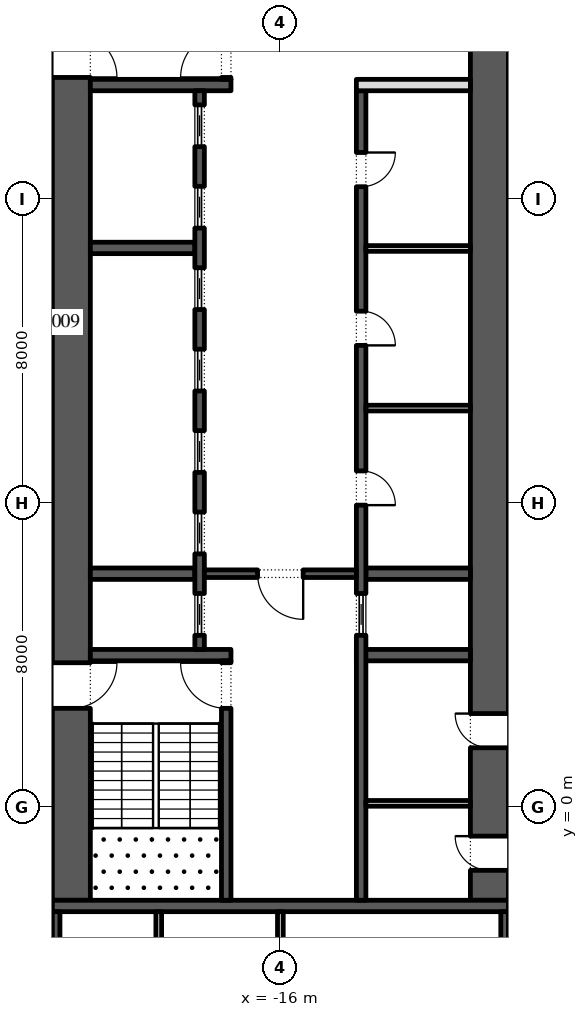
"""IFC4 building model, lengths in metres.
Left out: names, types, materials, properties, quantities, classifications, styles, units other than length and angle.
Written with IfcOpenShell. Run it as: python <this file> out.ifc"""

import sys

from ifc_helpers import new_model, si_unit, direction, frame, frame_2d, origin, place, context, subcontext, project, spatial, rectangle, extrude, element, fill, save


model = new_model("IFC4")
c1 = context("Model", 3, precision=1e-05, world=origin(), true_north=direction((0.0, 1.0)))
c2 = subcontext(c1, "Body", "Model", "MODEL_VIEW")
j1 = project(units=[si_unit("LENGTHUNIT", "METRE"), si_unit("PLANEANGLEUNIT", "RADIAN")], contexts=[c1])
p1 = place(None, origin())
s1 = spatial("IfcSite", under=j1, at=p1, CompositionType="ELEMENT")
p2 = place(p1, origin())
s2 = spatial("IfcBuilding", under=s1, at=p2, CompositionType="ELEMENT")
p3 = place(p2, frame((0.0, 0.0, 64.8)))
s3 = spatial("IfcBuildingStorey", under=s2, at=p3, CompositionType="ELEMENT", Elevation=64.8)
p4 = place(p3, frame((-21.5, -2.45, 0.0), z_axis=(0.0, 0.0, 1.0), x_axis=(0.0, 1.0, 0.0)))
e1 = element("IfcWall", 1, at=p4, inside=s3, PredefinedType="SHEAR", context=c2, shape_type="SweptSolid", body=[
    extrude(rectangle(XDim=27.9, YDim=1.0, at=frame_2d((13.95, 0.0))), origin(), (0.0, 0.0, 1.0), 4.0),
])
p5 = place(p4, frame((5.05, 0.0, 0.0)))
e2 = element("IfcOpeningElement", 2, at=p5, cuts=e1, PredefinedType="OPENING", context=c2, shape_type="SweptSolid", body=[
    extrude(rectangle(XDim=1.2, YDim=2.1, at=frame_2d((0.6, 1.05))), frame((0.0, 0.51, 0.0), z_axis=(0.0, -1.0, 0.0), x_axis=(1.0, 0.0, 0.0)), (0.0, 0.0, 1.0), 1.02),
])
p6 = place(p4, frame((21.65, 0.0, 0.0)))
e3 = element("IfcOpeningElement", 3, at=p6, cuts=e1, PredefinedType="OPENING", context=c2, shape_type="SweptSolid", body=[
    extrude(rectangle(XDim=1.2, YDim=2.1, at=frame_2d((0.6, 1.05))), frame((0.0, 0.51, 0.0), z_axis=(0.0, -1.0, 0.0), x_axis=(1.0, 0.0, 0.0)), (0.0, 0.0, 1.0), 1.02),
])
p7 = place(p3, frame((-10.5, -2.45, 0.0), z_axis=(0.0, 0.0, 1.0), x_axis=(0.0, 1.0, 0.0)))
e4 = element("IfcWall", 4, at=p7, inside=s3, PredefinedType="SHEAR", context=c2, shape_type="SweptSolid", body=[
    extrude(rectangle(XDim=27.9, YDim=1.0, at=frame_2d((13.95, 0.0))), origin(), (0.0, 0.0, 1.0), 4.0),
])
p8 = place(p7, frame((23.65, 0.0, 0.0)))
e5 = element("IfcOpeningElement", 5, at=p8, cuts=e4, PredefinedType="OPENING", context=c2, shape_type="SweptSolid", body=[
    extrude(rectangle(XDim=2.4, YDim=2.1, at=frame_2d((1.2, 1.05))), frame((0.0, 0.51, 0.0), z_axis=(0.0, -1.0, 0.0), x_axis=(1.0, 0.0, 0.0)), (0.0, 0.0, 1.0), 1.02),
])
p9 = place(p7, frame((0.788, 0.0, 0.0)))
e6 = element("IfcOpeningElement", 6, at=p9, cuts=e4, PredefinedType="OPENING", context=c2, shape_type="SweptSolid", body=[
    extrude(rectangle(XDim=0.9, YDim=2.1, at=frame_2d((0.45, 1.05))), frame((0.0, 0.51, 0.0), z_axis=(0.0, -1.0, 0.0), x_axis=(1.0, 0.0, 0.0)), (0.0, 0.0, 1.0), 1.02),
])
p10 = place(p7, frame((4.012, 0.0, 0.0)))
e7 = element("IfcOpeningElement", 7, at=p10, cuts=e4, PredefinedType="OPENING", context=c2, shape_type="SweptSolid", body=[
    extrude(rectangle(XDim=0.9, YDim=2.1, at=frame_2d((0.45, 1.05))), frame((0.0, 0.51, 0.0), z_axis=(0.0, -1.0, 0.0), x_axis=(1.0, 0.0, 0.0)), (0.0, 0.0, 1.0), 1.02),
])
p11 = place(p3, frame((-22.0, -2.6, 0.0), z_axis=(0.0, 0.0, 1.0), x_axis=(1.0, 0.0, 0.0)))
e8 = element("IfcWall", 8, at=p11, inside=s3, PredefinedType="SHEAR", context=c2, shape_type="SweptSolid", body=[
    extrude(rectangle(XDim=12.0, YDim=0.3, at=frame_2d((6.0, 0.0))), origin(), (0.0, 0.0, 1.0), 4.0),
])
p12 = place(p3, frame((-21.0, 4.0, 0.0), z_axis=(0.0, 0.0, 1.0), x_axis=(1.0, 0.0, 0.0)))
e9 = element("IfcWall", 9, at=p12, inside=s3, PredefinedType="SHEAR", context=c2, shape_type="SweptSolid", body=[
    extrude(rectangle(XDim=3.7, YDim=0.3, at=frame_2d((1.85, 0.0))), origin(), (0.0, 0.0, 1.0), 4.0),
])
p13 = place(p3, frame((-17.425, -2.45, 0.0), z_axis=(0.0, 0.0, 1.0), x_axis=(0.0, 1.0, 0.0)))
e10 = element("IfcWall", 10, at=p13, inside=s3, PredefinedType="SHEAR", context=c2, shape_type="SweptSolid", body=[
    extrude(rectangle(XDim=6.3, YDim=0.25, at=frame_2d((3.15, 0.0))), origin(), (0.0, 0.0, 1.0), 4.0),
])
p14 = place(p13, frame((5.05, 0.0, 0.0)))
e11 = element("IfcOpeningElement", 11, at=p14, cuts=e10, PredefinedType="OPENING", context=c2, shape_type="SweptSolid", body=[
    extrude(rectangle(XDim=1.2, YDim=2.1, at=frame_2d((0.6, 1.05))), frame((0.0, 0.135, 0.0), z_axis=(0.0, -1.0, 0.0), x_axis=(1.0, 0.0, 0.0)), (0.0, 0.0, 1.0), 0.27),
])
p15 = place(p3, frame((-21.0, 19.0, 0.0), z_axis=(0.0, 0.0, 1.0), x_axis=(1.0, 0.0, 0.0)))
e12 = element("IfcWall", 12, at=p15, inside=s3, PredefinedType="SHEAR", context=c2, shape_type="SweptSolid", body=[
    extrude(rectangle(XDim=3.7, YDim=0.3, at=frame_2d((1.85, 0.0))), origin(), (0.0, 0.0, 1.0), 4.0),
])
p16 = place(p3, frame((-17.425, 19.15, 0.0), z_axis=(0.0, 0.0, 1.0), x_axis=(0.0, 1.0, 0.0)))
e13 = element("IfcWall", 13, at=p16, inside=s3, PredefinedType="SHEAR", context=c2, shape_type="SweptSolid", body=[
    extrude(rectangle(XDim=6.3, YDim=0.25, at=frame_2d((3.15, 0.0))), origin(), (0.0, 0.0, 1.0), 4.0),
])
p17 = place(p16, frame((0.05, 0.0, 0.0)))
e14 = element("IfcOpeningElement", 14, at=p17, cuts=e13, PredefinedType="OPENING", context=c2, shape_type="SweptSolid", body=[
    extrude(rectangle(XDim=1.2, YDim=2.1, at=frame_2d((0.6, 1.05))), frame((0.0, 0.135, 0.0), z_axis=(0.0, -1.0, 0.0), x_axis=(1.0, 0.0, 0.0)), (0.0, 0.0, 1.0), 0.27),
])
for number, where, z_axis, x_axis in (
    (15, (-21.0, 6.143, 0.0), (0.0, 0.0, 1.0), (1.0, 0.0, 0.0)),
    (16, (-21.0, 14.714, 0.0), (0.0, 0.0, 1.0), (1.0, 0.0, 0.0)),
):
    element("IfcWall", number, at=place(p3, frame(where, z_axis=z_axis, x_axis=x_axis)), inside=s3, PredefinedType="SHEAR", context=c2, shape_type="SweptSolid", body=[
        extrude(rectangle(XDim=2.75, YDim=0.3, at=frame_2d((1.375, 0.0))), origin(), (0.0, 0.0, 1.0), 4.0),
    ])
p18 = place(p3, frame((-18.125, 4.15, 0.0), z_axis=(0.0, 0.0, 1.0), x_axis=(0.0, 1.0, 0.0)))
e17 = element("IfcWall", 17, at=p18, inside=s3, PredefinedType="SHEAR", context=c2, shape_type="SweptSolid", body=[
    extrude(rectangle(XDim=14.7, YDim=0.25, at=frame_2d((7.35, 0.0))), origin(), (0.0, 0.0, 1.0), 4.0),
])
p19 = place(p18, frame((0.371, 0.0, 0.0)))
e18 = element("IfcOpeningElement", 18, at=p19, cuts=e17, PredefinedType="OPENING", context=c2, shape_type="SweptSolid", body=[
    extrude(rectangle(XDim=1.1, YDim=2.1, at=frame_2d((0.55, 1.05))), frame((0.0, 0.135, 0.0), z_axis=(0.0, -1.0, 0.0), x_axis=(1.0, 0.0, 0.0)), (0.0, 0.0, 1.0), 0.27),
])
p20 = place(p18, frame((2.514, 0.0, 0.0)))
e19 = element("IfcOpeningElement", 19, at=p20, cuts=e17, PredefinedType="OPENING", context=c2, shape_type="SweptSolid", body=[
    extrude(rectangle(XDim=1.1, YDim=2.1, at=frame_2d((0.55, 1.05))), frame((0.0, 0.135, 0.0), z_axis=(0.0, -1.0, 0.0), x_axis=(1.0, 0.0, 0.0)), (0.0, 0.0, 1.0), 0.27),
])
p21 = place(p18, frame((4.657, 0.0, 0.0)))
e20 = element("IfcOpeningElement", 20, at=p21, cuts=e17, PredefinedType="OPENING", context=c2, shape_type="SweptSolid", body=[
    extrude(rectangle(XDim=1.1, YDim=2.1, at=frame_2d((0.55, 1.05))), frame((0.0, 0.135, 0.0), z_axis=(0.0, -1.0, 0.0), x_axis=(1.0, 0.0, 0.0)), (0.0, 0.0, 1.0), 0.27),
])
p22 = place(p18, frame((6.8, 0.0, 0.0)))
e21 = element("IfcOpeningElement", 21, at=p22, cuts=e17, PredefinedType="OPENING", context=c2, shape_type="SweptSolid", body=[
    extrude(rectangle(XDim=1.1, YDim=2.1, at=frame_2d((0.55, 1.05))), frame((0.0, 0.135, 0.0), z_axis=(0.0, -1.0, 0.0), x_axis=(1.0, 0.0, 0.0)), (0.0, 0.0, 1.0), 0.27),
])
p23 = place(p18, frame((8.943, 0.0, 0.0)))
e22 = element("IfcOpeningElement", 22, at=p23, cuts=e17, PredefinedType="OPENING", context=c2, shape_type="SweptSolid", body=[
    extrude(rectangle(XDim=1.1, YDim=2.1, at=frame_2d((0.55, 1.05))), frame((0.0, 0.135, 0.0), z_axis=(0.0, -1.0, 0.0), x_axis=(1.0, 0.0, 0.0)), (0.0, 0.0, 1.0), 0.27),
])
p24 = place(p18, frame((11.086, 0.0, 0.0)))
e23 = element("IfcOpeningElement", 23, at=p24, cuts=e17, PredefinedType="OPENING", context=c2, shape_type="SweptSolid", body=[
    extrude(rectangle(XDim=1.1, YDim=2.1, at=frame_2d((0.55, 1.05))), frame((0.0, 0.135, 0.0), z_axis=(0.0, -1.0, 0.0), x_axis=(1.0, 0.0, 0.0)), (0.0, 0.0, 1.0), 0.27),
])
p25 = place(p18, frame((13.229, 0.0, 0.0)))
e24 = element("IfcOpeningElement", 24, at=p25, cuts=e17, PredefinedType="OPENING", context=c2, shape_type="SweptSolid", body=[
    extrude(rectangle(XDim=1.1, YDim=2.1, at=frame_2d((0.55, 1.05))), frame((0.0, 0.135, 0.0), z_axis=(0.0, -1.0, 0.0), x_axis=(1.0, 0.0, 0.0)), (0.0, 0.0, 1.0), 0.27),
])
p26 = place(p3, frame((-14.0, 4.0, 0.0), z_axis=(0.0, 0.0, 1.0), x_axis=(1.0, 0.0, 0.0)))
e25 = element("IfcWall", 25, at=p26, inside=s3, PredefinedType="SHEAR", context=c2, shape_type="SweptSolid", body=[
    extrude(rectangle(XDim=3.0, YDim=0.3, at=frame_2d((1.5, 0.0))), origin(), (0.0, 0.0, 1.0), 4.0),
])
p27 = place(p3, frame((-13.75, 6.143, 0.0), z_axis=(0.0, 0.0, 1.0), x_axis=(1.0, 0.0, 0.0)))
e26 = element("IfcWall", 26, at=p27, inside=s3, PredefinedType="SHEAR", context=c2, shape_type="SweptSolid", body=[
    extrude(rectangle(XDim=2.75, YDim=0.3, at=frame_2d((1.375, 0.0))), origin(), (0.0, 0.0, 1.0), 4.0),
])
p28 = place(p3, frame((-13.875, -2.45, 0.0), z_axis=(0.0, 0.0, 1.0), x_axis=(0.0, 1.0, 0.0)))
e27 = element("IfcWall", 27, at=p28, inside=s3, PredefinedType="SHEAR", context=c2, shape_type="SweptSolid", body=[
    extrude(rectangle(XDim=21.3, YDim=0.25, at=frame_2d((10.65, 0.0))), origin(), (0.0, 0.0, 1.0), 4.0),
])
p29 = place(p28, frame((10.396, 0.0, 0.0)))
e28 = element("IfcOpeningElement", 28, at=p29, cuts=e27, PredefinedType="OPENING", context=c2, shape_type="SweptSolid", body=[
    extrude(rectangle(XDim=0.9, YDim=2.1, at=frame_2d((0.45, 1.05))), frame((0.0, 0.135, 0.0), z_axis=(0.0, -1.0, 0.0), x_axis=(1.0, 0.0, 0.0)), (0.0, 0.0, 1.0), 0.27),
])
p30 = place(p28, frame((14.6, 0.0, 0.0)))
e29 = element("IfcOpeningElement", 29, at=p30, cuts=e27, PredefinedType="OPENING", context=c2, shape_type="SweptSolid", body=[
    extrude(rectangle(XDim=0.9, YDim=2.1, at=frame_2d((0.45, 1.05))), frame((0.0, 0.135, 0.0), z_axis=(0.0, -1.0, 0.0), x_axis=(1.0, 0.0, 0.0)), (0.0, 0.0, 1.0), 0.27),
])
p31 = place(p28, frame((18.775, 0.0, 0.0)))
e30 = element("IfcOpeningElement", 30, at=p31, cuts=e27, PredefinedType="OPENING", context=c2, shape_type="SweptSolid", body=[
    extrude(rectangle(XDim=0.9, YDim=2.1, at=frame_2d((0.45, 1.05))), frame((0.0, 0.135, 0.0), z_axis=(0.0, -1.0, 0.0), x_axis=(1.0, 0.0, 0.0)), (0.0, 0.0, 1.0), 0.27),
])
p32 = place(p28, frame((6.971, 0.0, 0.0)))
e31 = element("IfcOpeningElement", 31, at=p32, cuts=e27, PredefinedType="OPENING", context=c2, shape_type="SweptSolid", body=[
    extrude(rectangle(XDim=1.1, YDim=2.1, at=frame_2d((0.55, 1.05))), frame((0.0, 0.135, 0.0), z_axis=(0.0, -1.0, 0.0), x_axis=(1.0, 0.0, 0.0)), (0.0, 0.0, 1.0), 0.27),
])
p33 = place(p3, frame((-14.0, 19.0, 0.0), z_axis=(0.0, 0.0, 1.0), x_axis=(1.0, 0.0, 0.0)))
e32 = element("IfcWall", 32, at=p33, inside=s3, PredefinedType="PARTITIONING", context=c2, shape_type="SweptSolid", body=[
    extrude(rectangle(XDim=3.0, YDim=0.3, at=frame_2d((1.5, 0.0))), origin(), (0.0, 0.0, 1.0), 4.0),
])
for number, where, z_axis, x_axis in (
    (33, (-13.75, 10.5, 0.0), (0.0, 0.0, 1.0), (1.0, 0.0, 0.0)),
    (34, (-13.75, 14.7, 0.0), (0.0, 0.0, 1.0), (1.0, 0.0, 0.0)),
):
    element("IfcWall", number, at=place(p3, frame(where, z_axis=z_axis, x_axis=x_axis)), inside=s3, PredefinedType="PARTITIONING", context=c2, shape_type="SweptSolid", body=[
        extrude(rectangle(XDim=2.75, YDim=0.15, at=frame_2d((1.375, 0.0))), origin(), (0.0, 0.0, 1.0), 4.0),
    ])
p34 = place(p3, frame((-18.0, 6.143, 0.0), z_axis=(0.0, 0.0, 1.0), x_axis=(1.0, 0.0, 0.0)))
e35 = element("IfcWall", 35, at=p34, inside=s3, PredefinedType="SHEAR", context=c2, shape_type="SweptSolid", body=[
    extrude(rectangle(XDim=4.0, YDim=0.2, at=frame_2d((2.0, 0.0))), origin(), (0.0, 0.0, 1.0), 4.0),
])
p35 = place(p34, frame((1.4, 0.0, 0.0)))
e36 = element("IfcOpeningElement", 36, at=p35, cuts=e35, PredefinedType="OPENING", context=c2, shape_type="SweptSolid", body=[
    extrude(rectangle(XDim=1.2, YDim=2.1, at=frame_2d((0.6, 1.05))), frame((0.0, 0.11, 0.0), z_axis=(0.0, -1.0, 0.0), x_axis=(1.0, 0.0, 0.0)), (0.0, 0.0, 1.0), 0.22),
])
p36 = place(p3, frame((-13.75, 0.1, 0.0), z_axis=(0.0, 0.0, 1.0), x_axis=(1.0, 0.0, 0.0)))
e37 = element("IfcWall", 37, at=p36, inside=s3, PredefinedType="PARTITIONING", context=c2, shape_type="SweptSolid", body=[
    extrude(rectangle(XDim=2.75, YDim=0.15, at=frame_2d((1.375, 0.0))), origin(), (0.0, 0.0, 1.0), 4.0),
])
p37 = place(p3, frame((-21.9, -15.8, 0.0), z_axis=(0.0, 0.0, 1.0), x_axis=(0.0, 1.0, 0.0)))
e38 = element("IfcWall", 38, at=p37, inside=s3, PredefinedType="SHEAR", context=c2, shape_type="SweptSolid", body=[
    extrude(rectangle(XDim=13.05, YDim=0.2, at=frame_2d((6.525, 0.0))), origin(), (0.0, 0.0, 1.0), 4.0),
])
p38 = place(p37, frame((4.488, 0.0, 0.0)))
e39 = element("IfcOpeningElement", 39, at=p38, cuts=e38, PredefinedType="OPENING", context=c2, shape_type="SweptSolid", body=[
    extrude(rectangle(XDim=0.9, YDim=2.1, at=frame_2d((0.45, 1.05))), frame((0.0, 0.11, 0.0), z_axis=(0.0, -1.0, 0.0), x_axis=(1.0, 0.0, 0.0)), (0.0, 0.0, 1.0), 0.22),
])
p39 = place(p37, frame((11.038, 0.0, 0.0)))
e40 = element("IfcOpeningElement", 40, at=p39, cuts=e38, PredefinedType="OPENING", context=c2, shape_type="SweptSolid", body=[
    extrude(rectangle(XDim=1.0, YDim=2.1, at=frame_2d((0.5, 1.05))), frame((0.0, 0.11, 0.0), z_axis=(0.0, -1.0, 0.0), x_axis=(1.0, 0.0, 0.0)), (0.0, 0.0, 1.0), 0.22),
])
p40 = place(p3, frame((-10.1, -15.8, 0.0), z_axis=(0.0, 0.0, 1.0), x_axis=(0.0, 1.0, 0.0)))
e41 = element("IfcWall", 41, at=p40, inside=s3, PredefinedType="SHEAR", context=c2, shape_type="SweptSolid", body=[
    extrude(rectangle(XDim=13.05, YDim=0.2, at=frame_2d((6.525, 0.0))), origin(), (0.0, 0.0, 1.0), 4.0),
])
p41 = place(p40, frame((6.075, 0.0, 0.0)))
e42 = element("IfcOpeningElement", 42, at=p41, cuts=e41, PredefinedType="OPENING", context=c2, shape_type="SweptSolid", body=[
    extrude(rectangle(XDim=0.9, YDim=2.1, at=frame_2d((0.45, 1.05))), frame((0.0, 0.11, 0.0), z_axis=(0.0, -1.0, 0.0), x_axis=(1.0, 0.0, 0.0)), (0.0, 0.0, 1.0), 0.22),
])
p42 = place(p3, frame((-16.0, -15.8, 0.0), z_axis=(0.0, 0.0, 1.0), x_axis=(0.0, 1.0, 0.0)))
e43 = element("IfcWall", 43, at=p42, inside=s3, PredefinedType="PARTITIONING", context=c2, shape_type="SweptSolid", body=[
    extrude(rectangle(XDim=13.05, YDim=0.15, at=frame_2d((6.525, 0.0))), origin(), (0.0, 0.0, 1.0), 4.0),
])
p43 = place(p42, frame((11.087, 0.0, 0.0)))
e44 = element("IfcOpeningElement", 44, at=p43, cuts=e43, PredefinedType="OPENING", context=c2, shape_type="SweptSolid", body=[
    extrude(rectangle(XDim=0.9, YDim=2.1, at=frame_2d((0.45, 1.05))), frame((0.0, 0.085, 0.0), z_axis=(0.0, -1.0, 0.0), x_axis=(1.0, 0.0, 0.0)), (0.0, 0.0, 1.0), 0.17),
])
p44 = place(p3, frame((-19.2, -5.775, 0.0), z_axis=(0.0, 0.0, 1.0), x_axis=(0.0, 1.0, 0.0)))
e45 = element("IfcWall", 45, at=p44, inside=s3, PredefinedType="PARTITIONING", context=c2, shape_type="SweptSolid", body=[
    extrude(rectangle(XDim=3.025, YDim=0.15, at=frame_2d((1.512, 0.0))), origin(), (0.0, 0.0, 1.0), 4.0),
])
p45 = place(p19, origin())
e46 = element("IfcDoor", 46, at=p45, inside=s3, OperationType="SLIDING_TO_LEFT", PredefinedType="DOOR", context=c2, shape_type="SweptSolid", body=[
    extrude(rectangle(XDim=1.1, YDim=2.1, at=frame_2d((0.55, 1.05))), frame((0.0, 0.025, 0.0), z_axis=(0.0, -1.0, 0.0), x_axis=(1.0, 0.0, 0.0)), (0.0, 0.0, 1.0), 0.05),
])
fill(e18, e46)
p46 = place(p20, origin())
e47 = element("IfcDoor", 47, at=p46, inside=s3, OperationType="SLIDING_TO_LEFT", PredefinedType="DOOR", context=c2, shape_type="SweptSolid", body=[
    extrude(rectangle(XDim=1.1, YDim=2.1, at=frame_2d((0.55, 1.05))), frame((0.0, 0.025, 0.0), z_axis=(0.0, -1.0, 0.0), x_axis=(1.0, 0.0, 0.0)), (0.0, 0.0, 1.0), 0.05),
])
fill(e19, e47)
p47 = place(p21, origin())
e48 = element("IfcDoor", 48, at=p47, inside=s3, OperationType="SLIDING_TO_LEFT", PredefinedType="DOOR", context=c2, shape_type="SweptSolid", body=[
    extrude(rectangle(XDim=1.1, YDim=2.1, at=frame_2d((0.55, 1.05))), frame((0.0, 0.025, 0.0), z_axis=(0.0, -1.0, 0.0), x_axis=(1.0, 0.0, 0.0)), (0.0, 0.0, 1.0), 0.05),
])
fill(e20, e48)
p48 = place(p22, origin())
e49 = element("IfcDoor", 49, at=p48, inside=s3, OperationType="SLIDING_TO_LEFT", PredefinedType="DOOR", context=c2, shape_type="SweptSolid", body=[
    extrude(rectangle(XDim=1.1, YDim=2.1, at=frame_2d((0.55, 1.05))), frame((0.0, 0.025, 0.0), z_axis=(0.0, -1.0, 0.0), x_axis=(1.0, 0.0, 0.0)), (0.0, 0.0, 1.0), 0.05),
])
fill(e21, e49)
p49 = place(p23, origin())
e50 = element("IfcDoor", 50, at=p49, inside=s3, OperationType="SLIDING_TO_LEFT", PredefinedType="DOOR", context=c2, shape_type="SweptSolid", body=[
    extrude(rectangle(XDim=1.1, YDim=2.1, at=frame_2d((0.55, 1.05))), frame((0.0, 0.025, 0.0), z_axis=(0.0, -1.0, 0.0), x_axis=(1.0, 0.0, 0.0)), (0.0, 0.0, 1.0), 0.05),
])
fill(e22, e50)
p50 = place(p24, origin())
e51 = element("IfcDoor", 51, at=p50, inside=s3, OperationType="SLIDING_TO_LEFT", PredefinedType="DOOR", context=c2, shape_type="SweptSolid", body=[
    extrude(rectangle(XDim=1.1, YDim=2.1, at=frame_2d((0.55, 1.05))), frame((0.0, 0.025, 0.0), z_axis=(0.0, -1.0, 0.0), x_axis=(1.0, 0.0, 0.0)), (0.0, 0.0, 1.0), 0.05),
])
fill(e23, e51)
p51 = place(p25, origin())
e52 = element("IfcDoor", 52, at=p51, inside=s3, OperationType="SLIDING_TO_LEFT", PredefinedType="DOOR", context=c2, shape_type="SweptSolid", body=[
    extrude(rectangle(XDim=1.1, YDim=2.1, at=frame_2d((0.55, 1.05))), frame((0.0, 0.025, 0.0), z_axis=(0.0, -1.0, 0.0), x_axis=(1.0, 0.0, 0.0)), (0.0, 0.0, 1.0), 0.05),
])
fill(e24, e52)
p52 = place(p29, frame((0.9, -0.2, 0.0), z_axis=(0.0, 0.0, 1.0), x_axis=(-1.0, 0.0, 0.0)))
e53 = element("IfcDoor", 53, at=p52, inside=s3, OperationType="SINGLE_SWING_LEFT", PredefinedType="DOOR", context=c2, shape_type="SweptSolid", body=[
    extrude(rectangle(XDim=0.9, YDim=2.1, at=frame_2d((0.45, 1.05))), frame((0.0, -0.075, 0.0), z_axis=(0.0, -1.0, 0.0), x_axis=(1.0, 0.0, 0.0)), (0.0, 0.0, 1.0), 0.05),
])
fill(e28, e53)
p53 = place(p30, frame((0.9, -0.2, 0.0), z_axis=(0.0, 0.0, 1.0), x_axis=(-1.0, 0.0, 0.0)))
e54 = element("IfcDoor", 54, at=p53, inside=s3, OperationType="SINGLE_SWING_LEFT", PredefinedType="DOOR", context=c2, shape_type="SweptSolid", body=[
    extrude(rectangle(XDim=0.9, YDim=2.1, at=frame_2d((0.45, 1.05))), frame((0.0, -0.075, 0.0), z_axis=(0.0, -1.0, 0.0), x_axis=(1.0, 0.0, 0.0)), (0.0, 0.0, 1.0), 0.05),
])
fill(e29, e54)
p54 = place(p31, frame((0.9, -0.2, 0.0), z_axis=(0.0, 0.0, 1.0), x_axis=(-1.0, 0.0, 0.0)))
e55 = element("IfcDoor", 55, at=p54, inside=s3, OperationType="SINGLE_SWING_RIGHT", PredefinedType="DOOR", context=c2, shape_type="SweptSolid", body=[
    extrude(rectangle(XDim=0.9, YDim=2.1, at=frame_2d((0.45, 1.05))), frame((0.0, -0.075, 0.0), z_axis=(0.0, -1.0, 0.0), x_axis=(1.0, 0.0, 0.0)), (0.0, 0.0, 1.0), 0.05),
])
fill(e30, e55)
p55 = place(p32, origin())
e56 = element("IfcDoor", 56, at=p55, inside=s3, OperationType="SLIDING_TO_LEFT", PredefinedType="DOOR", context=c2, shape_type="SweptSolid", body=[
    extrude(rectangle(XDim=1.1, YDim=2.1, at=frame_2d((0.55, 1.05))), frame((0.0, 0.025, 0.0), z_axis=(0.0, -1.0, 0.0), x_axis=(1.0, 0.0, 0.0)), (0.0, 0.0, 1.0), 0.05),
])
fill(e31, e56)
p56 = place(p35, frame((1.2, 0.0, 0.0), z_axis=(0.0, 0.0, 1.0), x_axis=(-1.0, 0.0, 0.0)))
e57 = element("IfcDoor", 57, at=p56, inside=s3, OperationType="SINGLE_SWING_RIGHT", PredefinedType="DOOR", context=c2, shape_type="SweptSolid", body=[
    extrude(rectangle(XDim=1.2, YDim=2.1, at=frame_2d((0.6, 1.05))), frame((0.0, 0.025, 0.0), z_axis=(0.0, -1.0, 0.0), x_axis=(1.0, 0.0, 0.0)), (0.0, 0.0, 1.0), 0.05),
])
fill(e36, e57)
p57 = place(p14, origin())
e58 = element("IfcDoor", 58, at=p57, inside=s3, OperationType="SINGLE_SWING_LEFT", PredefinedType="DOOR", context=c2, shape_type="SweptSolid", body=[
    extrude(rectangle(XDim=1.2, YDim=2.1, at=frame_2d((0.6, 1.05))), frame((0.0, 0.025, 0.0), z_axis=(0.0, -1.0, 0.0), x_axis=(1.0, 0.0, 0.0)), (0.0, 0.0, 1.0), 0.05),
])
fill(e11, e58)
p58 = place(p5, frame((1.2, 0.0, 0.0), z_axis=(0.0, 0.0, 1.0), x_axis=(-1.0, 0.0, 0.0)))
e59 = element("IfcDoor", 59, at=p58, inside=s3, OperationType="SINGLE_SWING_RIGHT", PredefinedType="DOOR", context=c2, shape_type="SweptSolid", body=[
    extrude(rectangle(XDim=1.2, YDim=2.1, at=frame_2d((0.6, 1.05))), frame((0.0, 0.025, 0.0), z_axis=(0.0, -1.0, 0.0), x_axis=(1.0, 0.0, 0.0)), (0.0, 0.0, 1.0), 0.05),
])
fill(e2, e59)
p59 = place(p17, origin())
e60 = element("IfcDoor", 60, at=p59, inside=s3, OperationType="SINGLE_SWING_RIGHT", PredefinedType="DOOR", context=c2, shape_type="SweptSolid", body=[
    extrude(rectangle(XDim=1.2, YDim=2.1, at=frame_2d((0.6, 1.05))), frame((0.0, 0.025, 0.0), z_axis=(0.0, -1.0, 0.0), x_axis=(1.0, 0.0, 0.0)), (0.0, 0.0, 1.0), 0.05),
])
fill(e14, e60)
p60 = place(p6, frame((1.2, 0.0, 0.0), z_axis=(0.0, 0.0, 1.0), x_axis=(-1.0, 0.0, 0.0)))
e61 = element("IfcDoor", 61, at=p60, inside=s3, OperationType="SINGLE_SWING_LEFT", PredefinedType="DOOR", context=c2, shape_type="SweptSolid", body=[
    extrude(rectangle(XDim=1.2, YDim=2.1, at=frame_2d((0.6, 1.05))), frame((0.0, 0.025, 0.0), z_axis=(0.0, -1.0, 0.0), x_axis=(1.0, 0.0, 0.0)), (0.0, 0.0, 1.0), 0.05),
])
fill(e3, e61)
p61 = place(p9, origin())
e62 = element("IfcDoor", 62, at=p61, inside=s3, OperationType="SINGLE_SWING_LEFT", PredefinedType="DOOR", context=c2, shape_type="SweptSolid", body=[
    extrude(rectangle(XDim=0.9, YDim=2.1, at=frame_2d((0.45, 1.05))), frame((0.0, 0.5, 0.0), z_axis=(0.0, -1.0, 0.0), x_axis=(1.0, 0.0, 0.0)), (0.0, 0.0, 1.0), 0.05),
])
fill(e6, e62)
p62 = place(p10, origin())
e63 = element("IfcDoor", 63, at=p62, inside=s3, OperationType="SINGLE_SWING_LEFT", PredefinedType="DOOR", context=c2, shape_type="SweptSolid", body=[
    extrude(rectangle(XDim=0.9, YDim=2.1, at=frame_2d((0.45, 1.05))), frame((0.0, 0.5, 0.0), z_axis=(0.0, -1.0, 0.0), x_axis=(1.0, 0.0, 0.0)), (0.0, 0.0, 1.0), 0.05),
])
fill(e7, e63)
save(model, sys.argv[1])
